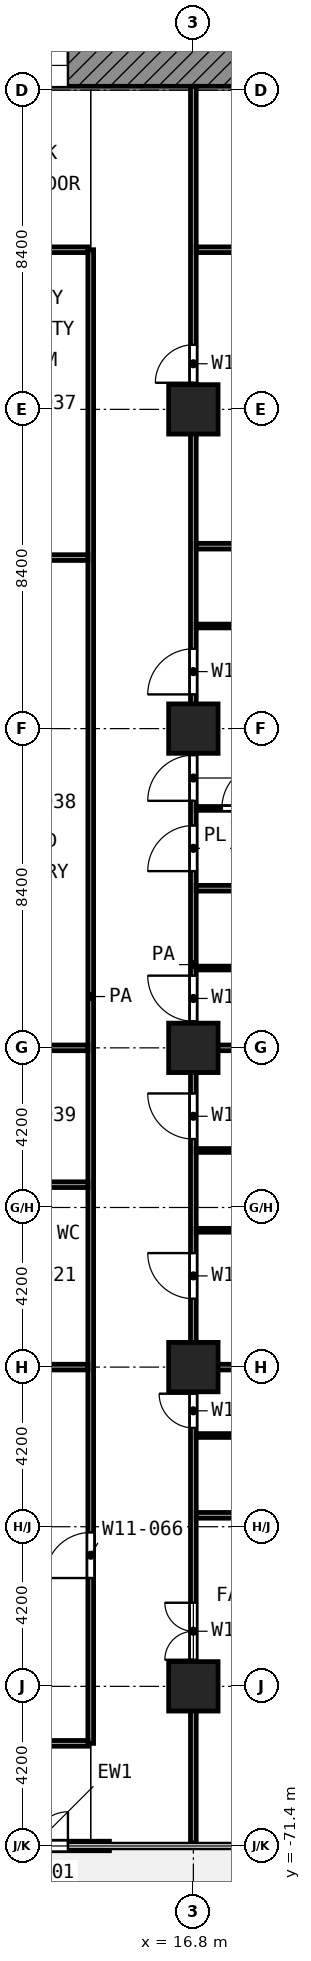
"""IFC4 building model, lengths in metres.
Left out: names, types, materials, properties, quantities, classifications, styles, units other than length and angle.
Written with IfcOpenShell. Run it as: python <this file> out.ifc"""

import sys

from ifc_helpers import new_model, si_unit, direction, frame, frame_2d, origin, origin_2d, place, context, subcontext, project, spatial, rectangle, extrude, element, fill, save


model = new_model("IFC4")
c1 = context("Model", 3, precision=1e-05, world=origin(), true_north=direction((0.0, 1.0)))
c2 = subcontext(c1, "Body", "Model", "MODEL_VIEW")
j1 = project(units=[si_unit("LENGTHUNIT", "METRE"), si_unit("PLANEANGLEUNIT", "RADIAN")], contexts=[c1])
p1 = place(None, origin())
s1 = spatial("IfcSite", under=j1, at=p1, CompositionType="ELEMENT")
p2 = place(p1, origin())
s2 = spatial("IfcBuilding", under=s1, at=p2, CompositionType="ELEMENT")
p3 = place(p2, frame((0.0, 0.0, 51.8)))
s3 = spatial("IfcBuildingStorey", under=s2, at=p3, CompositionType="ELEMENT", Elevation=51.8)
for number, where, z_axis, x_axis in (
    (1, (16.8, -33.6, 0.0), (0.0, 0.0, 1.0), (1.0, 0.0, 0.0)),
    (2, (16.8, -42.0, 0.0), (0.0, 0.0, 1.0), (1.0, 0.0, 0.0)),
    (3, (16.8, -50.4, 0.0), (0.0, 0.0, 1.0), (1.0, 0.0, 0.0)),
    (4, (16.8, -58.8, 0.0), (0.0, 0.0, 1.0), (1.0, 0.0, 0.0)),
    (5, (16.8, -67.2, 0.0), (0.0, 0.0, 1.0), (1.0, 0.0, 0.0)),
):
    element("IfcColumn", number, at=place(p3, frame(where, z_axis=z_axis, x_axis=x_axis)), inside=s3, PredefinedType="COLUMN", context=c2, shape_type="SweptSolid", body=[
        extrude(rectangle(XDim=1.3, YDim=1.3, at=origin_2d()), origin(), (0.0, 0.0, 1.0), 4.2),
    ])
p4 = place(p3, frame((10.608, -71.4, 0.0), z_axis=(0.0, 0.0, 1.0), x_axis=(1.0, 0.0, 0.0)))
e6 = element("IfcWall", 6, at=p4, inside=s3, PredefinedType="SOLIDWALL", context=c2, shape_type="SweptSolid", body=[
    extrude(rectangle(XDim=3.983, YDim=0.25, at=frame_2d((1.992, 0.0))), origin(), (0.0, 0.0, 1.0), 3.78),
])
p5 = place(p4, frame((1.092, 0.0, 0.0)))
e7 = element("IfcOpeningElement", 7, at=p5, cuts=e6, PredefinedType="OPENING", context=c2, shape_type="SweptSolid", body=[
    extrude(rectangle(XDim=1.8, YDim=2.1, at=frame_2d((0.9, 1.05))), frame((0.0, 0.135, 0.0), z_axis=(0.0, -1.0, 0.0), x_axis=(1.0, 0.0, 0.0)), (0.0, 0.0, 1.0), 0.27),
])
p6 = place(p3, frame((5.4, -24.55, 0.0), z_axis=(0.0, 0.0, 1.0), x_axis=(1.0, 0.0, 0.0)))
e8 = element("IfcWall", 8, at=p6, inside=s3, PredefinedType="SHEAR", context=c2, shape_type="SweptSolid", body=[
    extrude(rectangle(XDim=18.6, YDim=1.1, at=frame_2d((9.3, 0.0))), origin(), (0.0, 0.0, 1.0), 3.9),
])
p7 = place(p6, frame((6.3, 0.0, 0.0)))
e9 = element("IfcOpeningElement", 9, at=p7, cuts=e8, PredefinedType="OPENING", context=c2, shape_type="SweptSolid", body=[
    extrude(rectangle(XDim=1.8, YDim=2.1, at=frame_2d((0.9, 1.05))), frame((0.0, 0.56, 0.0), z_axis=(0.0, -1.0, 0.0), x_axis=(1.0, 0.0, 0.0)), (0.0, 0.0, 1.0), 1.12),
])
p8 = place(p3, frame((16.875, -60.6, 0.0), z_axis=(0.0, 0.0, 1.0), x_axis=(1.0, 0.0, 0.0)))
e10 = element("IfcWall", 10, at=p8, inside=s3, PredefinedType="PARTITIONING", context=c2, shape_type="SweptSolid", body=[
    extrude(rectangle(XDim=3.175, YDim=0.1, at=frame_2d((1.587, 0.0))), origin(), (0.0, 0.0, 1.0), 3.9),
])
p9 = place(p3, frame((16.875, -55.2, 0.0), z_axis=(0.0, 0.0, 1.0), x_axis=(1.0, 0.0, 0.0)))
e11 = element("IfcWall", 11, at=p9, inside=s3, PredefinedType="PARTITIONING", context=c2, shape_type="SweptSolid", body=[
    extrude(rectangle(XDim=2.573, YDim=0.1, at=frame_2d((1.287, 0.0))), origin(), (0.0, 0.0, 1.0), 3.9),
])
p10 = place(p3, frame((16.875, -53.1, 0.0), z_axis=(0.0, 0.0, 1.0), x_axis=(1.0, 0.0, 0.0)))
e12 = element("IfcWall", 12, at=p10, inside=s3, PredefinedType="PARTITIONING", context=c2, shape_type="SweptSolid", body=[
    extrude(rectangle(XDim=2.574, YDim=0.1, at=frame_2d((1.287, 0.0))), origin(), (0.0, 0.0, 1.0), 3.9),
])
p11 = place(p3, frame((16.875, -48.3, 0.0), z_axis=(0.0, 0.0, 1.0), x_axis=(1.0, 0.0, 0.0)))
e13 = element("IfcWall", 13, at=p11, inside=s3, PredefinedType="PARTITIONING", context=c2, shape_type="SweptSolid", body=[
    extrude(rectangle(XDim=2.575, YDim=0.1, at=frame_2d((1.288, 0.0))), origin(), (0.0, 0.0, 1.0), 3.9),
])
p12 = place(p3, frame((16.875, -44.1, 0.0), z_axis=(0.0, 0.0, 1.0), x_axis=(1.0, 0.0, 0.0)))
e14 = element("IfcWall", 14, at=p12, inside=s3, PredefinedType="PARTITIONING", context=c2, shape_type="SweptSolid", body=[
    extrude(rectangle(XDim=2.575, YDim=0.1, at=frame_2d((1.288, 0.0))), origin(), (0.0, 0.0, 1.0), 3.9),
])
p13 = place(p12, frame((0.675, 0.0, 0.0)))
e15 = element("IfcOpeningElement", 15, at=p13, cuts=e14, PredefinedType="OPENING", context=c2, shape_type="SweptSolid", body=[
    extrude(rectangle(XDim=1.2, YDim=2.1, at=frame_2d((0.6, 1.05))), frame((0.0, 0.06, 0.0), z_axis=(0.0, -1.0, 0.0), x_axis=(1.0, 0.0, 0.0)), (0.0, 0.0, 1.0), 0.12),
])
p14 = place(p3, frame((16.875, -39.3, 0.0), z_axis=(0.0, 0.0, 1.0), x_axis=(1.0, 0.0, 0.0)))
e16 = element("IfcWall", 16, at=p14, inside=s3, PredefinedType="PARTITIONING", context=c2, shape_type="SweptSolid", body=[
    extrude(rectangle(XDim=2.575, YDim=0.1, at=frame_2d((1.288, 0.0))), origin(), (0.0, 0.0, 1.0), 3.9),
])
p15 = place(p3, frame((11.175, -68.7, 0.0), z_axis=(0.0, 0.0, 1.0), x_axis=(1.0, 0.0, 0.0)))
e17 = element("IfcWall", 17, at=p15, inside=s3, PredefinedType="PARTITIONING", context=c2, shape_type="SweptSolid", body=[
    extrude(rectangle(XDim=2.85, YDim=0.15, at=frame_2d((1.425, 0.0))), origin(), (0.0, 0.0, 1.0), 3.9),
])
p16 = place(p3, frame((16.875, -62.7, 0.0), z_axis=(0.0, 0.0, 1.0), x_axis=(1.0, 0.0, 0.0)))
e18 = element("IfcWall", 18, at=p16, inside=s3, PredefinedType="PARTITIONING", context=c2, shape_type="SweptSolid", body=[
    extrude(rectangle(XDim=8.245, YDim=0.15, at=frame_2d((4.123, 0.0))), origin(), (0.0, 0.0, 1.0), 3.9),
])
p17 = place(p3, frame((11.175, -58.8, 0.0), z_axis=(0.0, 0.0, 1.0), x_axis=(1.0, 0.0, 0.0)))
e19 = element("IfcWall", 19, at=p17, inside=s3, PredefinedType="PARTITIONING", context=c2, shape_type="SweptSolid", body=[
    extrude(rectangle(XDim=2.85, YDim=0.15, at=frame_2d((1.425, 0.0))), origin(), (0.0, 0.0, 1.0), 3.9),
])
p18 = place(p3, frame((16.875, -58.8, 0.0), z_axis=(0.0, 0.0, 1.0), x_axis=(1.0, 0.0, 0.0)))
e20 = element("IfcWall", 20, at=p18, inside=s3, PredefinedType="PARTITIONING", context=c2, shape_type="SweptSolid", body=[
    extrude(rectangle(XDim=8.245, YDim=0.15, at=frame_2d((4.123, 0.0))), origin(), (0.0, 0.0, 1.0), 3.9),
])
for number, where, z_axis, x_axis in (
    (21, (11.175, -54.0, 0.0), (0.0, 0.0, 1.0), (1.0, 0.0, 0.0)),
    (22, (11.175, -50.4, 0.0), (0.0, 0.0, 1.0), (1.0, 0.0, 0.0)),
):
    element("IfcWall", number, at=place(p3, frame(where, z_axis=z_axis, x_axis=x_axis)), inside=s3, PredefinedType="PARTITIONING", context=c2, shape_type="SweptSolid", body=[
        extrude(rectangle(XDim=2.85, YDim=0.15, at=frame_2d((1.425, 0.0))), origin(), (0.0, 0.0, 1.0), 3.9),
    ])
for number, where, z_axis, x_axis in (
    (23, (16.875, -50.4, 0.0), (0.0, 0.0, 1.0), (1.0, 0.0, 0.0)),
    (24, (16.875, -46.2, 0.0), (0.0, 0.0, 1.0), (1.0, 0.0, 0.0)),
):
    element("IfcWall", number, at=place(p3, frame(where, z_axis=z_axis, x_axis=x_axis)), inside=s3, PredefinedType="PARTITIONING", context=c2, shape_type="SweptSolid", body=[
        extrude(rectangle(XDim=8.245, YDim=0.15, at=frame_2d((4.123, 0.0))), origin(), (0.0, 0.0, 1.0), 3.9),
    ])
p19 = place(p3, frame((11.175, -37.5, 0.0), z_axis=(0.0, 0.0, 1.0), x_axis=(1.0, 0.0, 0.0)))
e25 = element("IfcWall", 25, at=p19, inside=s3, PredefinedType="PARTITIONING", context=c2, shape_type="SweptSolid", body=[
    extrude(rectangle(XDim=2.85, YDim=0.15, at=frame_2d((1.425, 0.0))), origin(), (0.0, 0.0, 1.0), 3.9),
])
p20 = place(p3, frame((16.875, -37.2, 0.0), z_axis=(0.0, 0.0, 1.0), x_axis=(1.0, 0.0, 0.0)))
e26 = element("IfcWall", 26, at=p20, inside=s3, PredefinedType="PARTITIONING", context=c2, shape_type="SweptSolid", body=[
    extrude(rectangle(XDim=8.245, YDim=0.15, at=frame_2d((4.123, 0.0))), origin(), (0.0, 0.0, 1.0), 3.9),
])
p21 = place(p3, frame((11.175, -29.4, 0.0), z_axis=(0.0, 0.0, 1.0), x_axis=(1.0, 0.0, 0.0)))
e27 = element("IfcWall", 27, at=p21, inside=s3, PredefinedType="PARTITIONING", context=c2, shape_type="SweptSolid", body=[
    extrude(rectangle(XDim=2.85, YDim=0.15, at=frame_2d((1.425, 0.0))), origin(), (0.0, 0.0, 1.0), 3.9),
])
p22 = place(p3, frame((16.875, -29.4, 0.0), z_axis=(0.0, 0.0, 1.0), x_axis=(1.0, 0.0, 0.0)))
e28 = element("IfcWall", 28, at=p22, inside=s3, PredefinedType="PARTITIONING", context=c2, shape_type="SweptSolid", body=[
    extrude(rectangle(XDim=8.25, YDim=0.15, at=frame_2d((4.125, 0.0))), origin(), (0.0, 0.0, 1.0), 3.9),
])
p23 = place(p3, frame((14.1, -68.7, 0.0), z_axis=(0.0, 0.0, 1.0), x_axis=(0.0, 1.0, 0.0)))
e29 = element("IfcWall", 29, at=p23, inside=s3, PredefinedType="PARTITIONING", context=c2, shape_type="SweptSolid", body=[
    extrude(rectangle(XDim=39.3, YDim=0.15, at=frame_2d((19.65, 0.0))), origin(), (0.0, 0.0, 1.0), 3.9),
])
p24 = place(p23, frame((4.35, 0.0, 0.0)))
e30 = element("IfcOpeningElement", 30, at=p24, cuts=e29, PredefinedType="OPENING", context=c2, shape_type="SweptSolid", body=[
    extrude(rectangle(XDim=1.2, YDim=2.1, at=frame_2d((0.6, 1.05))), frame((0.0, 0.085, 0.0), z_axis=(0.0, -1.0, 0.0), x_axis=(1.0, 0.0, 0.0)), (0.0, 0.0, 1.0), 0.17),
])
p25 = place(p3, frame((16.8, -71.32, 0.0), z_axis=(0.0, 0.0, 1.0), x_axis=(0.0, 1.0, 0.0)))
e31 = element("IfcWall", 31, at=p25, inside=s3, PredefinedType="PARTITIONING", context=c2, shape_type="SweptSolid", body=[
    extrude(rectangle(XDim=46.22, YDim=0.15, at=frame_2d((23.11, 0.0))), origin(), (0.0, 0.0, 1.0), 3.9),
])
p26 = place(p25, frame((38.42, 0.0, 0.0)))
e32 = element("IfcOpeningElement", 32, at=p26, cuts=e31, PredefinedType="OPENING", context=c2, shape_type="SweptSolid", body=[
    extrude(rectangle(XDim=1.0, YDim=2.1, at=frame_2d((0.5, 1.05))), frame((0.0, 0.085, 0.0), z_axis=(0.0, -1.0, 0.0), x_axis=(1.0, 0.0, 0.0)), (0.0, 0.0, 1.0), 0.17),
])
p27 = place(p25, frame((30.22, 0.0, 0.0)))
e33 = element("IfcOpeningElement", 33, at=p27, cuts=e31, PredefinedType="OPENING", context=c2, shape_type="SweptSolid", body=[
    extrude(rectangle(XDim=1.2, YDim=2.1, at=frame_2d((0.6, 1.05))), frame((0.0, 0.085, 0.0), z_axis=(0.0, -1.0, 0.0), x_axis=(1.0, 0.0, 0.0)), (0.0, 0.0, 1.0), 0.17),
])
p28 = place(p25, frame((27.42, 0.0, 0.0)))
e34 = element("IfcOpeningElement", 34, at=p28, cuts=e31, PredefinedType="OPENING", context=c2, shape_type="SweptSolid", body=[
    extrude(rectangle(XDim=1.2, YDim=2.1, at=frame_2d((0.6, 1.05))), frame((0.0, 0.085, 0.0), z_axis=(0.0, -1.0, 0.0), x_axis=(1.0, 0.0, 0.0)), (0.0, 0.0, 1.0), 0.17),
])
p29 = place(p25, frame((25.57, 0.0, 0.0)))
e35 = element("IfcOpeningElement", 35, at=p29, cuts=e31, PredefinedType="OPENING", context=c2, shape_type="SweptSolid", body=[
    extrude(rectangle(XDim=1.2, YDim=2.1, at=frame_2d((0.6, 1.05))), frame((0.0, 0.085, 0.0), z_axis=(0.0, -1.0, 0.0), x_axis=(1.0, 0.0, 0.0)), (0.0, 0.0, 1.0), 0.17),
])
p30 = place(p25, frame((21.62, 0.0, 0.0)))
e36 = element("IfcOpeningElement", 36, at=p30, cuts=e31, PredefinedType="OPENING", context=c2, shape_type="SweptSolid", body=[
    extrude(rectangle(XDim=1.2, YDim=2.1, at=frame_2d((0.6, 1.05))), frame((0.0, 0.085, 0.0), z_axis=(0.0, -1.0, 0.0), x_axis=(1.0, 0.0, 0.0)), (0.0, 0.0, 1.0), 0.17),
])
p31 = place(p25, frame((14.32, 0.0, 0.0)))
e37 = element("IfcOpeningElement", 37, at=p31, cuts=e31, PredefinedType="OPENING", context=c2, shape_type="SweptSolid", body=[
    extrude(rectangle(XDim=1.2, YDim=2.1, at=frame_2d((0.6, 1.05))), frame((0.0, 0.085, 0.0), z_axis=(0.0, -1.0, 0.0), x_axis=(1.0, 0.0, 0.0)), (0.0, 0.0, 1.0), 0.17),
])
p32 = place(p25, frame((18.52, 0.0, 0.0)))
e38 = element("IfcOpeningElement", 38, at=p32, cuts=e31, PredefinedType="OPENING", context=c2, shape_type="SweptSolid", body=[
    extrude(rectangle(XDim=1.2, YDim=2.1, at=frame_2d((0.6, 1.05))), frame((0.0, 0.085, 0.0), z_axis=(0.0, -1.0, 0.0), x_axis=(1.0, 0.0, 0.0)), (0.0, 0.0, 1.0), 0.17),
])
p33 = place(p25, frame((10.92, 0.0, 0.0)))
e39 = element("IfcOpeningElement", 39, at=p33, cuts=e31, PredefinedType="OPENING", context=c2, shape_type="SweptSolid", body=[
    extrude(rectangle(XDim=0.9, YDim=2.1, at=frame_2d((0.45, 1.05))), frame((0.0, 0.085, 0.0), z_axis=(0.0, -1.0, 0.0), x_axis=(1.0, 0.0, 0.0)), (0.0, 0.0, 1.0), 0.17),
])
p34 = place(p25, frame((4.82, 0.0, 0.0)))
e40 = element("IfcOpeningElement", 40, at=p34, cuts=e31, PredefinedType="OPENING", context=c2, shape_type="SweptSolid", body=[
    extrude(rectangle(XDim=1.5, YDim=2.1, at=frame_2d((0.75, 1.05))), frame((0.0, 0.085, 0.0), z_axis=(0.0, -1.0, 0.0), x_axis=(1.0, 0.0, 0.0)), (0.0, 0.0, 1.0), 0.17),
])
p35 = place(p5, origin())
e41 = element("IfcDoor", 41, at=p35, inside=s3, OperationType="DOUBLE_DOOR_SINGLE_SWING", PredefinedType="DOOR", context=c2, shape_type="SweptSolid", body=[
    extrude(rectangle(XDim=1.8, YDim=2.1, at=frame_2d((0.9, 1.05))), frame((0.0, 0.025, 0.0), z_axis=(0.0, -1.0, 0.0), x_axis=(1.0, 0.0, 0.0)), (0.0, 0.0, 1.0), 0.05),
])
fill(e7, e41)
p36 = place(p7, origin())
e42 = element("IfcDoor", 42, at=p36, inside=s3, OperationType="DOUBLE_DOOR_SINGLE_SWING", PredefinedType="DOOR", context=c2, shape_type="SweptSolid", body=[
    extrude(rectangle(XDim=1.8, YDim=2.1, at=frame_2d((0.9, 1.05))), frame((0.0, 0.025, 0.0), z_axis=(0.0, -1.0, 0.0), x_axis=(1.0, 0.0, 0.0)), (0.0, 0.0, 1.0), 0.05),
])
fill(e9, e42)
p37 = place(p24, origin())
e43 = element("IfcDoor", 43, at=p37, inside=s3, OperationType="SINGLE_SWING_LEFT", PredefinedType="DOOR", context=c2, shape_type="SweptSolid", body=[
    extrude(rectangle(XDim=1.2, YDim=2.1, at=frame_2d((0.6, 1.05))), frame((0.0, 0.025, 0.0), z_axis=(0.0, -1.0, 0.0), x_axis=(1.0, 0.0, 0.0)), (0.0, 0.0, 1.0), 0.05),
])
fill(e30, e43)
p38 = place(p26, origin())
e44 = element("IfcDoor", 44, at=p38, inside=s3, OperationType="SINGLE_SWING_LEFT", PredefinedType="DOOR", context=c2, shape_type="SweptSolid", body=[
    extrude(rectangle(XDim=1.0, YDim=2.1, at=frame_2d((0.5, 1.05))), frame((0.0, 0.025, 0.0), z_axis=(0.0, -1.0, 0.0), x_axis=(1.0, 0.0, 0.0)), (0.0, 0.0, 1.0), 0.05),
])
fill(e32, e44)
p39 = place(p27, origin())
e45 = element("IfcDoor", 45, at=p39, inside=s3, OperationType="SINGLE_SWING_LEFT", PredefinedType="DOOR", context=c2, shape_type="SweptSolid", body=[
    extrude(rectangle(XDim=1.2, YDim=2.1, at=frame_2d((0.6, 1.05))), frame((0.0, 0.025, 0.0), z_axis=(0.0, -1.0, 0.0), x_axis=(1.0, 0.0, 0.0)), (0.0, 0.0, 1.0), 0.05),
])
fill(e33, e45)
p40 = place(p28, origin())
e46 = element("IfcDoor", 46, at=p40, inside=s3, OperationType="SINGLE_SWING_LEFT", PredefinedType="DOOR", context=c2, shape_type="SweptSolid", body=[
    extrude(rectangle(XDim=1.2, YDim=2.1, at=frame_2d((0.6, 1.05))), frame((0.0, 0.025, 0.0), z_axis=(0.0, -1.0, 0.0), x_axis=(1.0, 0.0, 0.0)), (0.0, 0.0, 1.0), 0.05),
])
fill(e34, e46)
p41 = place(p29, origin())
e47 = element("IfcDoor", 47, at=p41, inside=s3, OperationType="SINGLE_SWING_LEFT", PredefinedType="DOOR", context=c2, shape_type="SweptSolid", body=[
    extrude(rectangle(XDim=1.2, YDim=2.1, at=frame_2d((0.6, 1.05))), frame((0.0, 0.025, 0.0), z_axis=(0.0, -1.0, 0.0), x_axis=(1.0, 0.0, 0.0)), (0.0, 0.0, 1.0), 0.05),
])
fill(e35, e47)
p42 = place(p13, origin())
e48 = element("IfcDoor", 48, at=p42, inside=s3, OperationType="SINGLE_SWING_RIGHT", PredefinedType="DOOR", context=c2, shape_type="SweptSolid", body=[
    extrude(rectangle(XDim=1.2, YDim=2.1, at=frame_2d((0.6, 1.05))), frame((0.0, 0.025, 0.0), z_axis=(0.0, -1.0, 0.0), x_axis=(1.0, 0.0, 0.0)), (0.0, 0.0, 1.0), 0.05),
])
fill(e15, e48)
p43 = place(p30, origin())
e49 = element("IfcDoor", 49, at=p43, inside=s3, OperationType="SINGLE_SWING_RIGHT", PredefinedType="DOOR", context=c2, shape_type="SweptSolid", body=[
    extrude(rectangle(XDim=1.2, YDim=2.1, at=frame_2d((0.6, 1.05))), frame((0.0, 0.025, 0.0), z_axis=(0.0, -1.0, 0.0), x_axis=(1.0, 0.0, 0.0)), (0.0, 0.0, 1.0), 0.05),
])
fill(e36, e49)
p44 = place(p31, origin())
e50 = element("IfcDoor", 50, at=p44, inside=s3, OperationType="SINGLE_SWING_RIGHT", PredefinedType="DOOR", context=c2, shape_type="SweptSolid", body=[
    extrude(rectangle(XDim=1.2, YDim=2.1, at=frame_2d((0.6, 1.05))), frame((0.0, 0.025, 0.0), z_axis=(0.0, -1.0, 0.0), x_axis=(1.0, 0.0, 0.0)), (0.0, 0.0, 1.0), 0.05),
])
fill(e37, e50)
p45 = place(p32, origin())
e51 = element("IfcDoor", 51, at=p45, inside=s3, OperationType="SINGLE_SWING_RIGHT", PredefinedType="DOOR", context=c2, shape_type="SweptSolid", body=[
    extrude(rectangle(XDim=1.2, YDim=2.1, at=frame_2d((0.6, 1.05))), frame((0.0, 0.025, 0.0), z_axis=(0.0, -1.0, 0.0), x_axis=(1.0, 0.0, 0.0)), (0.0, 0.0, 1.0), 0.05),
])
fill(e38, e51)
p46 = place(p33, origin())
e52 = element("IfcDoor", 52, at=p46, inside=s3, OperationType="SINGLE_SWING_RIGHT", PredefinedType="DOOR", context=c2, shape_type="SweptSolid", body=[
    extrude(rectangle(XDim=0.9, YDim=2.1, at=frame_2d((0.45, 1.05))), frame((0.0, 0.025, 0.0), z_axis=(0.0, -1.0, 0.0), x_axis=(1.0, 0.0, 0.0)), (0.0, 0.0, 1.0), 0.05),
])
fill(e39, e52)
p47 = place(p34, origin())
e53 = element("IfcDoor", 53, at=p47, inside=s3, OperationType="DOUBLE_DOOR_SINGLE_SWING", PredefinedType="DOOR", context=c2, shape_type="SweptSolid", body=[
    extrude(rectangle(XDim=1.5, YDim=2.1, at=frame_2d((0.75, 1.05))), frame((0.0, 0.025, 0.0), z_axis=(0.0, -1.0, 0.0), x_axis=(1.0, 0.0, 0.0)), (0.0, 0.0, 1.0), 0.05),
])
fill(e40, e53)
save(model, sys.argv[1])
